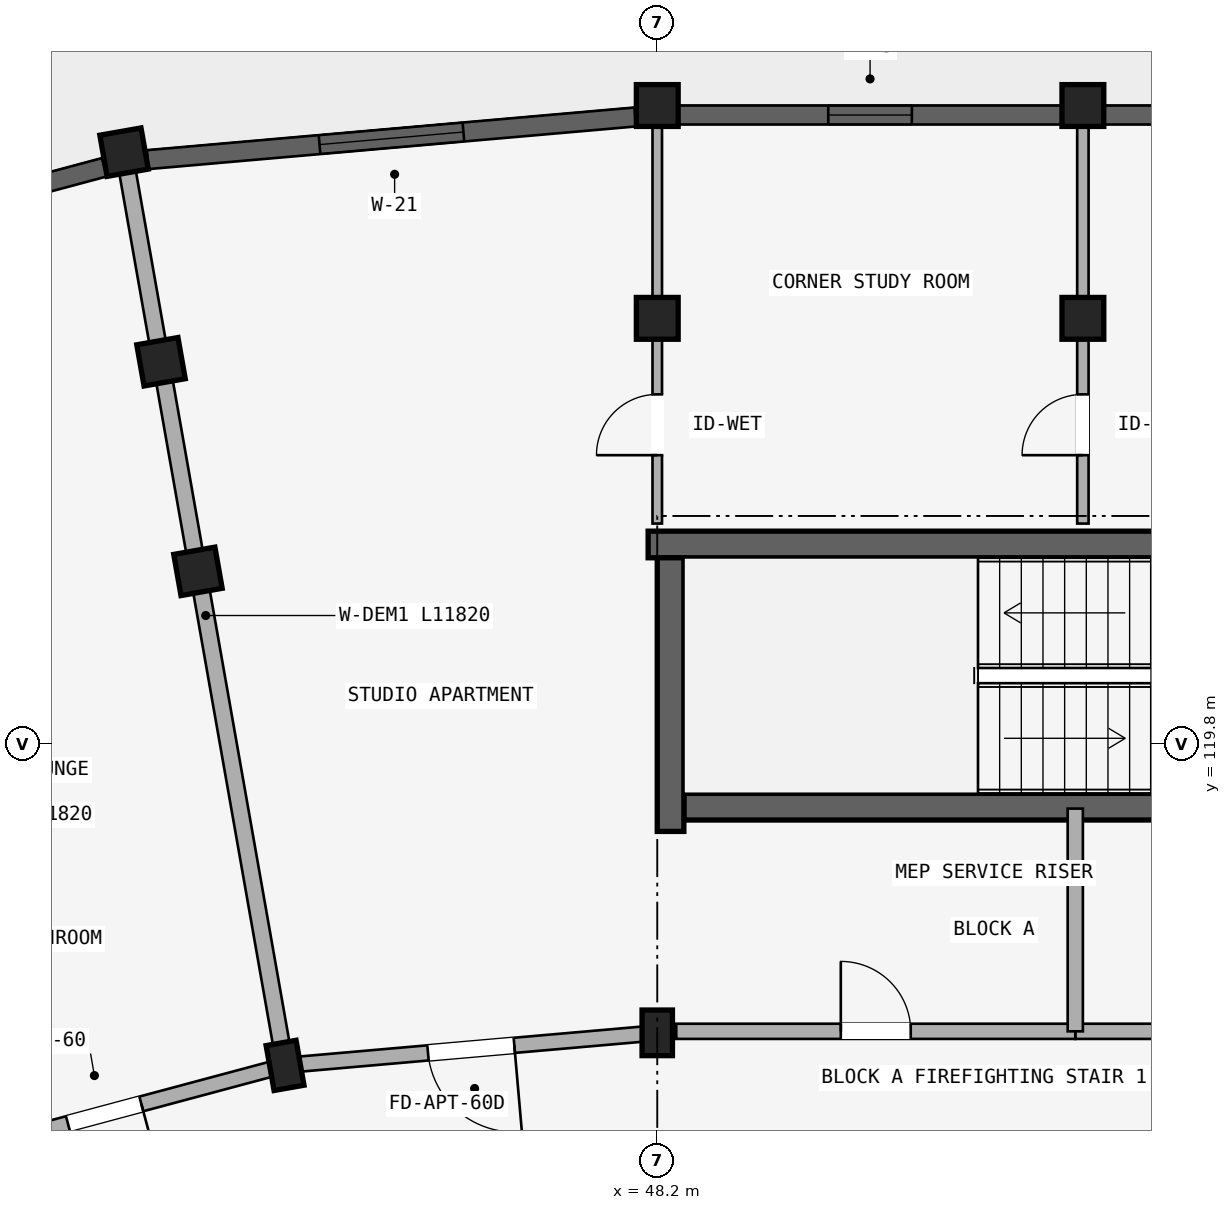
"""IFC4 building model, lengths in metres.
Left out: names, types, materials, properties, quantities, classifications, styles, units other than length and angle.
Written with IfcOpenShell. Run it as: python <this file> out.ifc"""

import sys

from ifc_helpers import new_model, si_unit, direction, frame, frame_2d, origin, origin_2d, place, context, subcontext, project, spatial, rectangle, extrude, element, fill, save


model = new_model("IFC4")
c1 = context("Model", 3, precision=1e-05, world=origin(), true_north=direction((0.0, 1.0)))
c2 = subcontext(c1, "Body", "Model", "MODEL_VIEW")
j1 = project(units=[si_unit("LENGTHUNIT", "METRE"), si_unit("PLANEANGLEUNIT", "RADIAN")], contexts=[c1])
p1 = place(None, origin())
s1 = spatial("IfcSite", under=j1, at=p1, CompositionType="ELEMENT")
p2 = place(p1, origin())
s2 = spatial("IfcBuilding", under=s1, at=p2, CompositionType="ELEMENT")
p3 = place(p2, frame((0.0, 0.0, 43.35)))
s3 = spatial("IfcBuildingStorey", under=s2, at=p3, CompositionType="ELEMENT", Elevation=43.35)
p4 = place(p3, frame((48.08, 122.425, 0.0), z_axis=(0.0, 0.0, 1.0), x_axis=(1.0, 0.0, 0.0)))
e1 = element("IfcWall", 1, at=p4, inside=s3, PredefinedType="SHEAR", context=c2, shape_type="SweptSolid", body=[
    extrude(rectangle(XDim=8.545, YDim=0.35, at=frame_2d((4.272, 0.0))), origin(), (0.0, 0.0, 1.0), 2.93),
])
p5 = place(p3, frame((48.55, 118.975, 0.0), z_axis=(0.0, 0.0, 1.0), x_axis=(1.0, 0.0, 0.0)))
e2 = element("IfcWall", 2, at=p5, inside=s3, PredefinedType="SHEAR", context=c2, shape_type="SweptSolid", body=[
    extrude(rectangle(XDim=8.075, YDim=0.35, at=frame_2d((4.038, 0.0))), origin(), (0.0, 0.0, 1.0), 2.93),
])
p6 = place(p5, frame((6.38, 0.0, 0.0)))
e3 = element("IfcOpeningElement", 3, at=p6, cuts=e2, PredefinedType="OPENING", context=c2, shape_type="SweptSolid", body=[
    extrude(rectangle(XDim=1.24, YDim=2.15, at=frame_2d((0.62, 1.075))), frame((0.0, 0.185, 0.0), z_axis=(0.0, -1.0, 0.0), x_axis=(1.0, 0.0, 0.0)), (0.0, 0.0, 1.0), 0.37),
])
p7 = place(p3, frame((48.375, 118.65, 0.0), z_axis=(0.0, 0.0, 1.0), x_axis=(0.0, 1.0, 0.0)))
e4 = element("IfcWall", 4, at=p7, inside=s3, PredefinedType="SHEAR", context=c2, shape_type="SweptSolid", body=[
    extrude(rectangle(XDim=3.6, YDim=0.35, at=frame_2d((1.8, 0.0))), origin(), (0.0, 0.0, 1.0), 2.93),
])
p8 = place(p3, frame((48.2, 116.0, 0.0), z_axis=(0.0, 0.0, 1.0), x_axis=(1.0, 0.0, 0.0)))
e5 = element("IfcColumn", 5, at=p8, inside=s3, PredefinedType="COLUMN", context=c2, shape_type="SweptSolid", body=[
    extrude(rectangle(XDim=0.4, YDim=0.6, at=origin_2d()), origin(), (0.0, 0.0, 1.0), 2.93),
])
p9 = place(p3, frame((48.2, 125.4, 0.0), z_axis=(0.0, 0.0, 1.0), x_axis=(1.0, 0.0, 0.0)))
e6 = element("IfcColumn", 6, at=p9, inside=s3, PredefinedType="COLUMN", context=c2, shape_type="SweptSolid", body=[
    extrude(rectangle(XDim=0.55, YDim=0.55, at=origin_2d()), origin(), (0.0, 0.0, 1.0), 2.93),
])
p10 = place(p3, frame((48.2, 128.2, 0.0), z_axis=(0.0, 0.0, 1.0), x_axis=(1.0, 0.0, 0.0)))
e7 = element("IfcColumn", 7, at=p10, inside=s3, PredefinedType="COLUMN", context=c2, shape_type="SweptSolid", body=[
    extrude(rectangle(XDim=0.55, YDim=0.55, at=origin_2d()), origin(), (0.0, 0.0, 1.0), 2.97),
])
p11 = place(p3, frame((43.303, 115.572, 0.0), z_axis=(0.0, 0.0, 1.0), x_axis=(0.984807753012, 0.173648177667, 0.0)))
e8 = element("IfcColumn", 8, at=p11, inside=s3, PredefinedType="COLUMN", context=c2, shape_type="SweptSolid", body=[
    extrude(rectangle(XDim=0.4, YDim=0.6, at=origin_2d()), origin(), (0.0, 0.0, 1.0), 2.93),
])
for number, where, z_axis, x_axis in (
    (9, (42.157, 122.071, 0.0), (0.0, 0.0, 1.0), (0.985, 0.174, 0.0)),
    (10, (41.671, 124.829, 0.0), (0.0, 0.0, 1.0), (0.985, 0.174, 0.0)),
):
    element("IfcColumn", number, at=place(p3, frame(where, z_axis=z_axis, x_axis=x_axis)), inside=s3, PredefinedType="COLUMN", context=c2, shape_type="SweptSolid", body=[
        extrude(rectangle(XDim=0.55, YDim=0.55, at=origin_2d()), origin(), (0.0, 0.0, 1.0), 2.93),
    ])
p12 = place(p3, frame((41.185, 127.586, 0.0), z_axis=(0.0, 0.0, 1.0), x_axis=(0.984807753012, 0.173648177667, 0.0)))
e11 = element("IfcColumn", 11, at=p12, inside=s3, PredefinedType="COLUMN", context=c2, shape_type="SweptSolid", body=[
    extrude(rectangle(XDim=0.55, YDim=0.55, at=origin_2d()), origin(), (0.0, 0.0, 1.0), 2.97),
])
p13 = place(p3, frame((53.8, 125.4, 0.0), z_axis=(0.0, 0.0, 1.0), x_axis=(1.0, 0.0, 0.0)))
e12 = element("IfcColumn", 12, at=p13, inside=s3, PredefinedType="COLUMN", context=c2, shape_type="SweptSolid", body=[
    extrude(rectangle(XDim=0.55, YDim=0.55, at=origin_2d()), origin(), (0.0, 0.0, 1.0), 2.93),
])
p14 = place(p3, frame((53.8, 128.2, 0.0), z_axis=(0.0, 0.0, 1.0), x_axis=(1.0, 0.0, 0.0)))
e13 = element("IfcColumn", 13, at=p14, inside=s3, PredefinedType="COLUMN", context=c2, shape_type="SweptSolid", body=[
    extrude(rectangle(XDim=0.55, YDim=0.55, at=origin_2d()), origin(), (0.0, 0.0, 1.0), 2.97),
])
p15 = place(p3, frame((53.7, 116.02, 0.0), z_axis=(0.0, 0.0, 1.0), x_axis=(1.0, 0.0, 0.0)))
e14 = element("IfcWall", 14, at=p15, inside=s3, PredefinedType="STANDARD", context=c2, shape_type="SweptSolid", body=[
    extrude(rectangle(XDim=5.65, YDim=0.2, at=frame_2d((2.825, 0.0))), origin(), (0.0, 0.0, 1.0), 2.372),
])
p16 = place(p15, frame((1.923, 0.0, 0.0)))
e15 = element("IfcOpeningElement", 15, at=p16, cuts=e14, PredefinedType="OPENING", context=c2, shape_type="SweptSolid", body=[
    extrude(rectangle(XDim=1.24, YDim=2.15, at=frame_2d((0.62, 1.075))), frame((0.0, 0.11, 0.0), z_axis=(0.0, -1.0, 0.0), x_axis=(1.0, 0.0, 0.0)), (0.0, 0.0, 1.0), 0.22),
])
p17 = place(p3, frame((48.45, 116.02, 0.0), z_axis=(0.0, 0.0, 1.0), x_axis=(1.0, 0.0, 0.0)))
e16 = element("IfcWall", 16, at=p17, inside=s3, PredefinedType="STANDARD", context=c2, shape_type="SweptSolid", body=[
    extrude(rectangle(XDim=5.25, YDim=0.2, at=frame_2d((2.625, 0.0))), origin(), (0.0, 0.0, 1.0), 2.372),
])
p18 = place(p17, frame((2.165, 0.0, 0.0)))
e17 = element("IfcOpeningElement", 17, at=p18, cuts=e16, PredefinedType="OPENING", context=c2, shape_type="SweptSolid", body=[
    extrude(rectangle(XDim=0.92, YDim=2.1, at=frame_2d((0.46, 1.05))), frame((0.0, 0.11, 0.0), z_axis=(0.0, -1.0, 0.0), x_axis=(1.0, 0.0, 0.0)), (0.0, 0.0, 1.0), 0.22),
])
p19 = place(p3, frame((53.7, 116.02, 0.0), z_axis=(0.0, 0.0, 1.0), x_axis=(0.0, 1.0, 0.0)))
e18 = element("IfcWall", 18, at=p19, inside=s3, PredefinedType="STANDARD", context=c2, shape_type="SweptSolid", body=[
    extrude(rectangle(XDim=2.93, YDim=0.2, at=frame_2d((1.465, 0.0))), origin(), (0.0, 0.0, 1.0), 2.372),
])
p20 = place(p3, frame((53.8, 122.7, 0.0), z_axis=(0.0, 0.0, 1.0), x_axis=(0.0, 1.0, 0.0)))
e19 = element("IfcWall", 19, at=p20, inside=s3, PredefinedType="PARTITIONING", context=c2, shape_type="SweptSolid", body=[
    extrude(rectangle(XDim=5.22, YDim=0.15, at=frame_2d((2.61, 0.0))), origin(), (0.0, 0.0, 1.0), 2.372),
])
p21 = place(p20, frame((0.9, 0.0, 0.0)))
e20 = element("IfcOpeningElement", 20, at=p21, cuts=e19, PredefinedType="OPENING", context=c2, shape_type="SweptSolid", body=[
    extrude(rectangle(XDim=0.8, YDim=2.1, at=frame_2d((0.4, 1.05))), frame((0.0, 0.085, 0.0), z_axis=(0.0, -1.0, 0.0), x_axis=(1.0, 0.0, 0.0)), (0.0, 0.0, 1.0), 0.17),
])
p22 = place(p3, frame((48.2, 116.0, 0.0), z_axis=(0.0, 0.0, 1.0), x_axis=(-0.996193663584, -0.087167566415, 0.0)))
e21 = element("IfcWall", 21, at=p22, inside=s3, PredefinedType="STANDARD", context=c2, shape_type="SweptSolid", body=[
    extrude(rectangle(XDim=4.916, YDim=0.2, at=frame_2d((2.458, 0.0))), origin(), (0.0, 0.0, 1.0), 2.372),
])
p23 = place(p22, frame((1.888, 0.0, 0.0)))
e22 = element("IfcOpeningElement", 22, at=p23, cuts=e21, PredefinedType="OPENING", context=c2, shape_type="SweptSolid", body=[
    extrude(rectangle(XDim=1.14, YDim=2.15, at=frame_2d((0.57, 1.075))), frame((0.0, 0.11, 0.0), z_axis=(0.0, -1.0, 0.0), x_axis=(1.0, 0.0, 0.0)), (0.0, 0.0, 1.0), 0.22),
])
p24 = place(p3, frame((43.303, 115.572, 0.0), z_axis=(0.0, 0.0, 1.0), x_axis=(-0.965930095386, -0.258803112091, 0.0)))
e23 = element("IfcWall", 23, at=p24, inside=s3, PredefinedType="STANDARD", context=c2, shape_type="SweptSolid", body=[
    extrude(rectangle(XDim=4.916, YDim=0.2, at=frame_2d((2.458, 0.0))), origin(), (0.0, 0.0, 1.0), 2.372),
])
p25 = place(p24, frame((1.958, 0.0, 0.0)))
e24 = element("IfcOpeningElement", 24, at=p25, cuts=e23, PredefinedType="OPENING", context=c2, shape_type="SweptSolid", body=[
    extrude(rectangle(XDim=1.0, YDim=2.15, at=frame_2d((0.5, 1.075))), frame((0.0, 0.11, 0.0), z_axis=(0.0, -1.0, 0.0), x_axis=(1.0, 0.0, 0.0)), (0.0, 0.0, 1.0), 0.22),
])
p26 = place(p3, frame((48.2, 122.7, 0.0), z_axis=(0.0, 0.0, 1.0), x_axis=(0.0, 1.0, 0.0)))
e25 = element("IfcWall", 25, at=p26, inside=s3, PredefinedType="PARTITIONING", context=c2, shape_type="SweptSolid", body=[
    extrude(rectangle(XDim=5.22, YDim=0.125, at=frame_2d((2.61, 0.0))), origin(), (0.0, 0.0, 1.0), 2.372),
])
p27 = place(p26, frame((0.9, 0.0, 0.0)))
e26 = element("IfcOpeningElement", 26, at=p27, cuts=e25, PredefinedType="OPENING", context=c2, shape_type="SweptSolid", body=[
    extrude(rectangle(XDim=0.8, YDim=2.1, at=frame_2d((0.4, 1.05))), frame((0.0, 0.073, 0.0), z_axis=(0.0, -1.0, 0.0), x_axis=(1.0, 0.0, 0.0)), (0.0, 0.0, 1.0), 0.145),
])
p28 = place(p3, frame((43.286, 115.67, 0.0), z_axis=(0.0, 0.0, 1.0), x_axis=(-0.173646292378, 0.984808085438, 0.0)))
e27 = element("IfcWall", 27, at=p28, inside=s3, PredefinedType="STANDARD", context=c2, shape_type="SweptSolid", body=[
    extrude(rectangle(XDim=11.82, YDim=0.22, at=frame_2d((5.91, 0.0))), origin(), (0.0, 0.0, 1.0), 2.372),
])
p29 = place(p3, frame((47.911, 128.049, 0.0), z_axis=(0.0, 0.0, 1.0), x_axis=(-0.996192647716, -0.087179175472, 0.0)))
e28 = element("IfcWall", 28, at=p29, inside=s3, PredefinedType="STANDARD", context=c2, shape_type="SweptSolid", body=[
    extrude(rectangle(XDim=6.441, YDim=0.25, at=frame_2d((3.22, 0.0))), origin(), (0.0, 0.0, 1.0), 2.412),
])
p30 = place(p29, frame((2.271, 0.0, 0.462)))
e29 = element("IfcOpeningElement", 29, at=p30, cuts=e28, PredefinedType="OPENING", context=c2, shape_type="SweptSolid", body=[
    extrude(rectangle(XDim=1.9, YDim=1.75, at=frame_2d((0.95, 0.875))), frame((0.0, 0.135, 0.0), z_axis=(0.0, -1.0, 0.0), x_axis=(1.0, 0.0, 0.0)), (0.0, 0.0, 1.0), 0.27),
])
p31 = place(p3, frame((40.927, 127.388, 0.0), z_axis=(0.0, 0.0, 1.0), x_axis=(-0.965929779688, -0.258804290367, 0.0)))
e30 = element("IfcWall", 30, at=p31, inside=s3, PredefinedType="STANDARD", context=c2, shape_type="SweptSolid", body=[
    extrude(rectangle(XDim=6.441, YDim=0.25, at=frame_2d((3.221, 0.0))), origin(), (0.0, 0.0, 1.0), 2.412),
])
p32 = place(p31, frame((4.155, 0.0, 0.562)))
e31 = element("IfcOpeningElement", 31, at=p32, cuts=e30, PredefinedType="OPENING", context=c2, shape_type="SweptSolid", body=[
    extrude(rectangle(XDim=1.2, YDim=1.5, at=frame_2d((0.6, 0.75))), frame((0.0, 0.135, 0.0), z_axis=(0.0, -1.0, 0.0), x_axis=(1.0, 0.0, 0.0)), (0.0, 0.0, 1.0), 0.27),
])
p33 = place(p31, frame((1.594, 0.0, 0.0)))
e32 = element("IfcOpeningElement", 32, at=p33, cuts=e30, PredefinedType="OPENING", context=c2, shape_type="SweptSolid", body=[
    extrude(rectangle(XDim=1.32, YDim=2.15, at=frame_2d((0.66, 1.075))), frame((0.0, 0.135, 0.0), z_axis=(0.0, -1.0, 0.0), x_axis=(1.0, 0.0, 0.0)), (0.0, 0.0, 1.0), 0.27),
])
p34 = place(p3, frame((48.479, 128.075, 0.0), z_axis=(0.0, 0.0, 1.0), x_axis=(1.0, 0.0, 0.0)))
e33 = element("IfcWall", 33, at=p34, inside=s3, PredefinedType="STANDARD", context=c2, shape_type="SweptSolid", body=[
    extrude(rectangle(XDim=5.043, YDim=0.25, at=frame_2d((2.521, 0.0))), origin(), (0.0, 0.0, 1.0), 2.48),
])
p35 = place(p34, frame((1.971, 0.0, 0.83)))
e34 = element("IfcOpeningElement", 34, at=p35, cuts=e33, PredefinedType="OPENING", context=c2, shape_type="SweptSolid", body=[
    extrude(rectangle(XDim=1.1, YDim=1.45, at=frame_2d((0.55, 0.725))), frame((0.0, 0.135, 0.0), z_axis=(0.0, -1.0, 0.0), x_axis=(1.0, 0.0, 0.0)), (0.0, 0.0, 1.0), 0.27),
])
p36 = place(p3, frame((54.079, 128.075, 0.0), z_axis=(0.0, 0.0, 1.0), x_axis=(1.0, 0.0, 0.0)))
e35 = element("IfcWall", 35, at=p36, inside=s3, PredefinedType="STANDARD", context=c2, shape_type="SweptSolid", body=[
    extrude(rectangle(XDim=5.043, YDim=0.25, at=frame_2d((2.521, 0.0))), origin(), (0.0, 0.0, 1.0), 2.48),
])
p37 = place(p36, frame((2.046, 0.0, 0.88)))
e36 = element("IfcOpeningElement", 36, at=p37, cuts=e35, PredefinedType="OPENING", context=c2, shape_type="SweptSolid", body=[
    extrude(rectangle(XDim=0.95, YDim=1.35, at=frame_2d((0.475, 0.675))), frame((0.0, 0.135, 0.0), z_axis=(0.0, -1.0, 0.0), x_axis=(1.0, 0.0, 0.0)), (0.0, 0.0, 1.0), 0.27),
])
p38 = place(p30, origin())
e37 = element("IfcWindow", 37, at=p38, inside=s3, PartitioningType="DOUBLE_PANEL_VERTICAL", PredefinedType="WINDOW", context=c2, shape_type="SweptSolid", body=[
    extrude(rectangle(XDim=1.9, YDim=1.75, at=frame_2d((0.95, 0.875))), frame((0.0, 0.03, 0.0), z_axis=(0.0, -1.0, 0.0), x_axis=(1.0, 0.0, 0.0)), (0.0, 0.0, 1.0), 0.06),
])
fill(e29, e37)
p39 = place(p35, origin())
e38 = element("IfcWindow", 38, at=p39, inside=s3, PartitioningType="SINGLE_PANEL", PredefinedType="WINDOW", context=c2, shape_type="SweptSolid", body=[
    extrude(rectangle(XDim=1.1, YDim=1.45, at=frame_2d((0.55, 0.725))), frame((0.0, 0.03, 0.0), z_axis=(0.0, -1.0, 0.0), x_axis=(1.0, 0.0, 0.0)), (0.0, 0.0, 1.0), 0.06),
])
fill(e34, e38)
p40 = place(p18, origin())
e39 = element("IfcDoor", 39, at=p40, inside=s3, OperationType="SINGLE_SWING_LEFT", PredefinedType="DOOR", context=c2, shape_type="SweptSolid", body=[
    extrude(rectangle(XDim=0.92, YDim=2.1, at=frame_2d((0.46, 1.05))), frame((0.0, 0.025, 0.0), z_axis=(0.0, -1.0, 0.0), x_axis=(1.0, 0.0, 0.0)), (0.0, 0.0, 1.0), 0.05),
])
fill(e17, e39)
p41 = place(p21, origin())
e40 = element("IfcDoor", 40, at=p41, inside=s3, OperationType="SINGLE_SWING_LEFT", PredefinedType="DOOR", context=c2, shape_type="SweptSolid", body=[
    extrude(rectangle(XDim=0.8, YDim=2.1, at=frame_2d((0.4, 1.05))), frame((0.0, 0.025, 0.0), z_axis=(0.0, -1.0, 0.0), x_axis=(1.0, 0.0, 0.0)), (0.0, 0.0, 1.0), 0.05),
])
fill(e20, e40)
p42 = place(p27, origin())
e41 = element("IfcDoor", 41, at=p42, inside=s3, OperationType="SINGLE_SWING_LEFT", PredefinedType="DOOR", context=c2, shape_type="SweptSolid", body=[
    extrude(rectangle(XDim=0.8, YDim=2.1, at=frame_2d((0.4, 1.05))), frame((0.0, 0.025, 0.0), z_axis=(0.0, -1.0, 0.0), x_axis=(1.0, 0.0, 0.0)), (0.0, 0.0, 1.0), 0.05),
])
fill(e26, e41)
p43 = place(p23, frame((1.14, 0.0, 0.0), z_axis=(0.0, 0.0, 1.0), x_axis=(-1.0, 0.0, 0.0)))
e42 = element("IfcDoor", 42, at=p43, inside=s3, OperationType="SINGLE_SWING_RIGHT", PredefinedType="DOOR", context=c2, shape_type="SweptSolid", body=[
    extrude(rectangle(XDim=1.14, YDim=2.15, at=frame_2d((0.57, 1.075))), frame((0.0, 0.025, 0.0), z_axis=(0.0, -1.0, 0.0), x_axis=(1.0, 0.0, 0.0)), (0.0, 0.0, 1.0), 0.05),
])
fill(e22, e42)
p44 = place(p25, origin())
e43 = element("IfcDoor", 43, at=p44, inside=s3, OperationType="SINGLE_SWING_LEFT", PredefinedType="DOOR", context=c2, shape_type="SweptSolid", body=[
    extrude(rectangle(XDim=1.0, YDim=2.15, at=frame_2d((0.5, 1.075))), frame((0.0, 0.025, 0.0), z_axis=(0.0, -1.0, 0.0), x_axis=(1.0, 0.0, 0.0)), (0.0, 0.0, 1.0), 0.05),
])
fill(e24, e43)
save(model, sys.argv[1])
